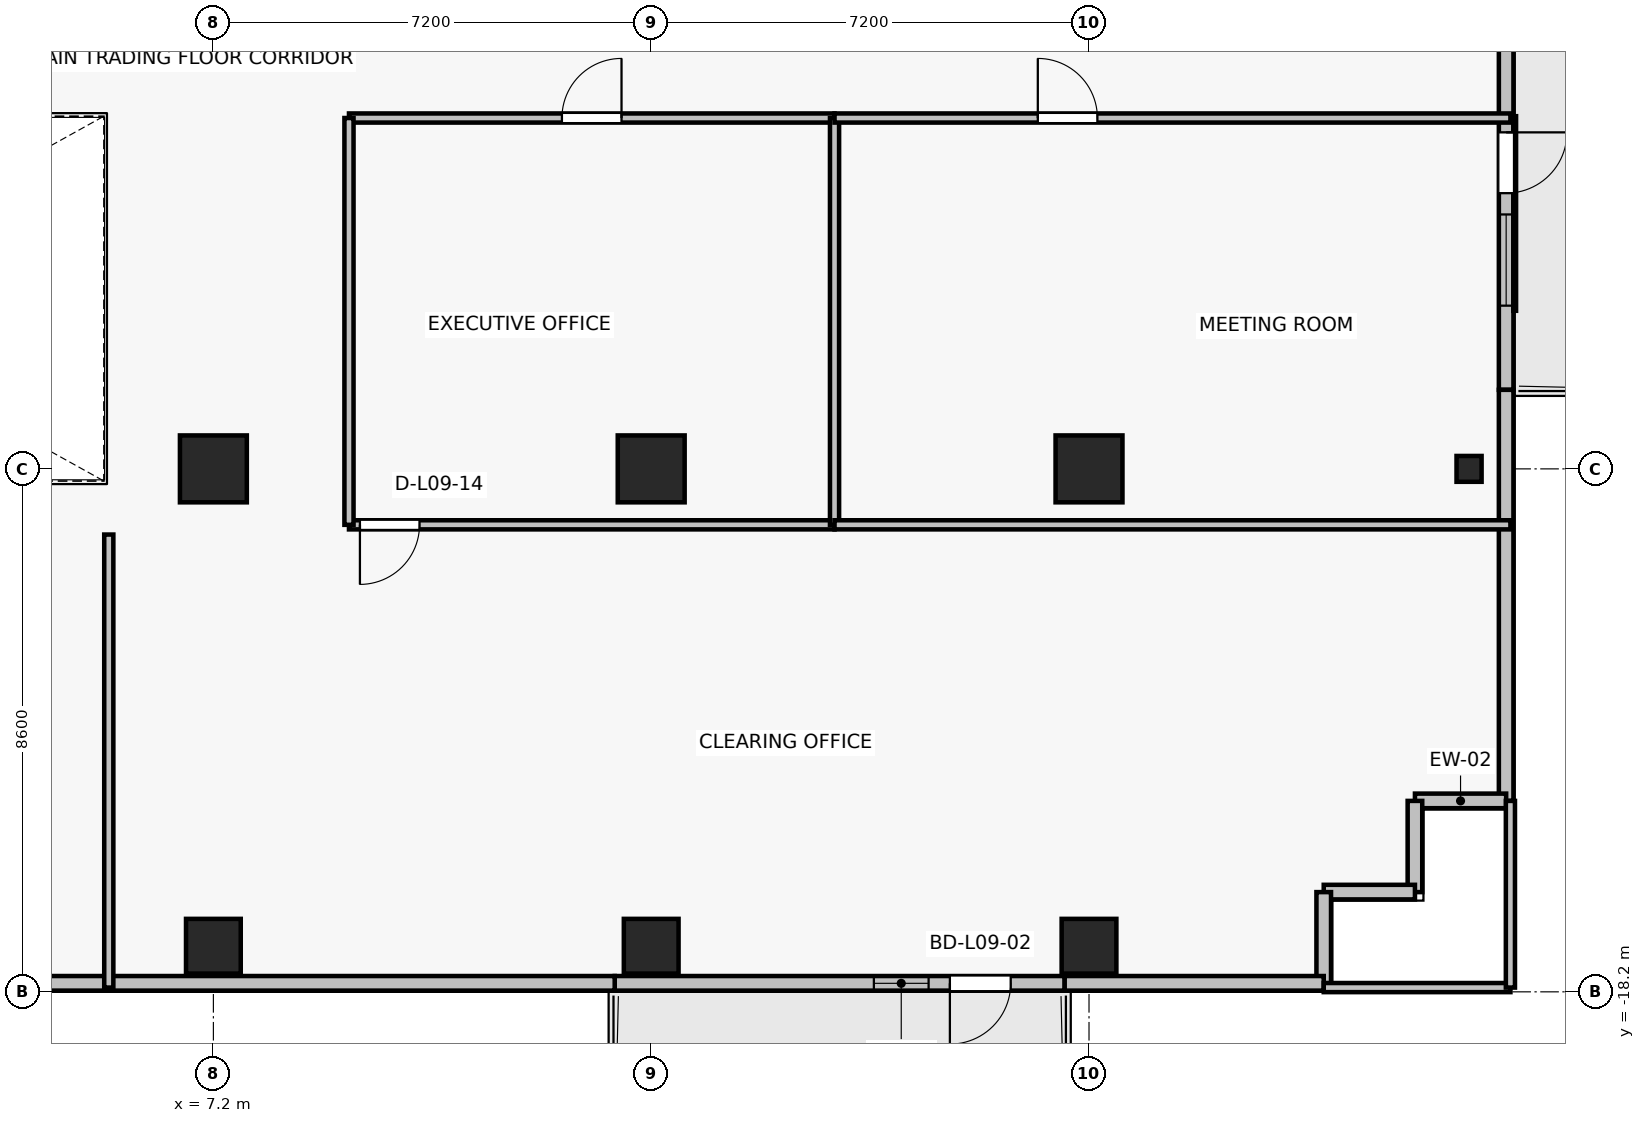
"""IFC4 building model, lengths in metres.
Left out: names, types, materials, properties, quantities, classifications, styles, units other than length and angle.
Written with IfcOpenShell. Run it as: python <this file> out.ifc"""

import sys

from ifc_helpers import new_model, si_unit, direction, frame, frame_2d, origin, origin_2d, place, context, subcontext, project, spatial, rectangle, i_section, extrude, source, transform, mapped, element, fill, save


model = new_model("IFC4")
c1 = context("Model", 3, precision=1e-05, world=origin(), true_north=direction((0.0, 1.0)))
c2 = subcontext(c1, "Body", "Model", "MODEL_VIEW")
j1 = project(units=[si_unit("LENGTHUNIT", "METRE"), si_unit("PLANEANGLEUNIT", "RADIAN")], contexts=[c1])
p1 = place(None, origin())
s1 = spatial("IfcSite", under=j1, at=p1, CompositionType="ELEMENT")
p2 = place(p1, origin())
s2 = spatial("IfcBuilding", under=s1, at=p2, CompositionType="ELEMENT")
p3 = place(p2, frame((0.0, 0.0, 37.3)))
s3 = spatial("IfcBuildingStorey", under=s2, at=p3, CompositionType="ELEMENT", Elevation=37.3)
for number, where, z_axis, x_axis in (
    (1, (7.2, -9.6, 0.0), (0.0, 0.0, 1.0), (1.0, 0.0, 0.0)),
    (2, (14.4, -9.6, 0.0), (0.0, 0.0, 1.0), (1.0, 0.0, 0.0)),
    (3, (21.6, -9.6, 0.0), (0.0, 0.0, 1.0), (1.0, 0.0, 0.0)),
):
    element("IfcColumn", number, at=place(p3, frame(where, z_axis=z_axis, x_axis=x_axis)), inside=s3, PredefinedType="COLUMN", context=c2, shape_type="SweptSolid", body=[
        extrude(rectangle(XDim=1.1, YDim=1.1, at=origin_2d()), origin(), (0.0, 0.0, 1.0), 3.3),
    ])
for number, where, z_axis, x_axis in (
    (4, (7.2, -17.45, 0.0), (0.0, 0.0, 1.0), (1.0, 0.0, 0.0)),
    (5, (14.4, -17.45, 0.0), (0.0, 0.0, 1.0), (1.0, 0.0, 0.0)),
    (6, (21.6, -17.45, 0.0), (0.0, 0.0, 1.0), (1.0, 0.0, 0.0)),
):
    element("IfcColumn", number, at=place(p3, frame(where, z_axis=z_axis, x_axis=x_axis)), inside=s3, PredefinedType="COLUMN", context=c2, shape_type="SweptSolid", body=[
        extrude(rectangle(XDim=0.9, YDim=0.9, at=origin_2d()), origin(), (0.0, 0.0, 1.0), 3.3),
    ])
p4 = place(p3, frame((27.85, -9.6, 0.0), z_axis=(0.0, 0.0, 1.0), x_axis=(1.0, 0.0, 0.0)))
e7 = element("IfcColumn", 7, at=p4, inside=s3, PredefinedType="COLUMN", context=c2, shape_type="SweptSolid", body=[
    extrude(i_section(OverallWidth=0.412, OverallDepth=0.425, WebThickness=0.026, FlangeThickness=0.039, FilletRadius=0.015, at=origin_2d()), origin(), (0.0, 0.0, 1.0), 3.3),
])
p5 = place(p3, frame((21.2, -18.06, 0.0), z_axis=(0.0, 0.0, 1.0), x_axis=(-1.0, 0.0, 0.0)))
e8 = element("IfcWall", 8, at=p5, inside=s3, PredefinedType="SOLIDWALL", context=c2, shape_type="SweptSolid", body=[
    extrude(rectangle(XDim=7.4, YDim=0.24, at=frame_2d((3.7, 0.0))), origin(), (0.0, 0.0, 1.0), 2.665),
])
p6 = place(p5, frame((0.888, 0.0, 0.0)))
e9 = element("IfcOpeningElement", 9, at=p6, cuts=e8, PredefinedType="OPENING", context=c2, shape_type="SweptSolid", body=[
    extrude(rectangle(XDim=1.0, YDim=2.2, at=frame_2d((0.5, 1.1))), frame((0.0, 0.13, 0.0), z_axis=(0.0, -1.0, 0.0), x_axis=(1.0, 0.0, 0.0)), (0.0, 0.0, 1.0), 0.26),
])
p7 = place(p5, frame((2.238, 0.0, 0.85)))
e10 = element("IfcOpeningElement", 10, at=p7, cuts=e8, PredefinedType="OPENING", context=c2, shape_type="SweptSolid", body=[
    extrude(rectangle(XDim=0.9, YDim=1.35, at=frame_2d((0.45, 0.675))), frame((0.0, 0.13, 0.0), z_axis=(0.0, -1.0, 0.0), x_axis=(1.0, 0.0, 0.0)), (0.0, 0.0, 1.0), 0.26),
])
p8 = place(p3, frame((28.46, -2.5, 0.0), z_axis=(0.0, 0.0, 1.0), x_axis=(0.0, -1.0, 0.0)))
e11 = element("IfcWall", 11, at=p8, inside=s3, PredefinedType="SOLIDWALL", context=c2, shape_type="SweptSolid", body=[
    extrude(rectangle(XDim=5.8, YDim=0.24, at=frame_2d((2.9, 0.0))), origin(), (0.0, 0.0, 1.0), 3.075),
])
p9 = place(p8, frame((1.566, 0.0, 0.0)))
e12 = element("IfcOpeningElement", 12, at=p9, cuts=e11, PredefinedType="OPENING", context=c2, shape_type="SweptSolid", body=[
    extrude(rectangle(XDim=1.0, YDim=2.2, at=frame_2d((0.5, 1.1))), frame((0.0, 0.13, 0.0), z_axis=(0.0, -1.0, 0.0), x_axis=(1.0, 0.0, 0.0)), (0.0, 0.0, 1.0), 0.26),
])
p10 = place(p8, frame((2.916, 0.0, 0.85)))
e13 = element("IfcOpeningElement", 13, at=p10, cuts=e11, PredefinedType="OPENING", context=c2, shape_type="SweptSolid", body=[
    extrude(rectangle(XDim=1.5, YDim=1.6, at=frame_2d((0.75, 0.8))), frame((0.0, 0.13, 0.0), z_axis=(0.0, -1.0, 0.0), x_axis=(1.0, 0.0, 0.0)), (0.0, 0.0, 1.0), 0.26),
])
p11 = place(p3, frame((28.46, -15.06, 0.0), z_axis=(0.0, 0.0, 1.0), x_axis=(0.0, 1.0, 0.0)))
e14 = element("IfcWall", 14, at=p11, inside=s3, PredefinedType="SOLIDWALL", context=c2, shape_type="SweptSolid", body=[
    extrude(rectangle(XDim=6.76, YDim=0.24, at=frame_2d((3.38, 0.0))), origin(), (0.0, 0.0, 1.0), 3.075),
])
for number, where, z_axis, x_axis in (
    (15, (26.96, -15.06, 0.0), (0.0, 0.0, 1.0), (1.0, 0.0, 0.0)),
    (16, (26.96, -16.56, 0.0), (0.0, 0.0, 1.0), (0.0, 1.0, 0.0)),
    (17, (25.46, -16.56, 0.0), (0.0, 0.0, 1.0), (1.0, 0.0, 0.0)),
    (18, (25.46, -18.06, 0.0), (0.0, 0.0, 1.0), (0.0, 1.0, 0.0)),
):
    element("IfcWall", number, at=place(p3, frame(where, z_axis=z_axis, x_axis=x_axis)), inside=s3, PredefinedType="SOLIDWALL", context=c2, shape_type="SweptSolid", body=[
        extrude(rectangle(XDim=1.5, YDim=0.24, at=frame_2d((0.75, 0.0))), origin(), (0.0, 0.0, 1.0), 3.075),
    ])
p12 = place(p3, frame((21.2, -18.06, 0.0), z_axis=(0.0, 0.0, 1.0), x_axis=(1.0, 0.0, 0.0)))
e19 = element("IfcWall", 19, at=p12, inside=s3, PredefinedType="SOLIDWALL", context=c2, shape_type="SweptSolid", body=[
    extrude(rectangle(XDim=4.26, YDim=0.24, at=frame_2d((2.13, 0.0))), origin(), (0.0, 0.0, 1.0), 3.075),
])
p13 = place(p3, frame((3.34, -18.06, 0.0), z_axis=(0.0, 0.0, 1.0), x_axis=(1.0, 0.0, 0.0)))
e20 = element("IfcWall", 20, at=p13, inside=s3, PredefinedType="SOLIDWALL", context=c2, shape_type="SweptSolid", body=[
    extrude(rectangle(XDim=10.46, YDim=0.24, at=frame_2d((5.23, 0.0))), origin(), (0.0, 0.0, 1.0), 2.665),
])
p14 = place(p3, frame((17.415, -10.52, 0.0), z_axis=(0.0, 0.0, 1.0), x_axis=(-1.0, 0.0, 0.0)))
e21 = element("IfcWall", 21, at=p14, inside=s3, PredefinedType="PARTITIONING", context=c2, shape_type="SweptSolid", body=[
    extrude(rectangle(XDim=7.985, YDim=0.15, at=frame_2d((3.993, 0.0))), origin(), (0.0, 0.0, 1.0), 2.465),
])
p15 = place(p14, frame((6.825, 0.0, 0.0)))
e22 = element("IfcOpeningElement", 22, at=p15, cuts=e21, PredefinedType="OPENING", context=c2, shape_type="SweptSolid", body=[
    extrude(rectangle(XDim=0.98, YDim=2.15, at=frame_2d((0.49, 1.075))), frame((0.0, 0.085, 0.0), z_axis=(0.0, -1.0, 0.0), x_axis=(1.0, 0.0, 0.0)), (0.0, 0.0, 1.0), 0.17),
])
p16 = place(p3, frame((9.43, -3.83, 0.0), z_axis=(0.0, 0.0, 1.0), x_axis=(1.0, 0.0, 0.0)))
e23 = element("IfcWall", 23, at=p16, inside=s3, PredefinedType="PARTITIONING", context=c2, shape_type="SweptSolid", body=[
    extrude(rectangle(XDim=7.985, YDim=0.15, at=frame_2d((3.993, 0.0))), origin(), (0.0, 0.0, 1.0), 2.465),
])
p17 = place(p16, frame((3.502, 0.0, 0.0)))
e24 = element("IfcOpeningElement", 24, at=p17, cuts=e23, PredefinedType="OPENING", context=c2, shape_type="SweptSolid", body=[
    extrude(rectangle(XDim=0.98, YDim=2.15, at=frame_2d((0.49, 1.075))), frame((0.0, 0.085, 0.0), z_axis=(0.0, -1.0, 0.0), x_axis=(1.0, 0.0, 0.0)), (0.0, 0.0, 1.0), 0.17),
])
for number, where, z_axis, x_axis in (
    (25, (9.43, -10.52, 0.0), (0.0, 0.0, 1.0), (0.0, 1.0, 0.0)),
    (26, (17.415, -3.83, 0.0), (0.0, 0.0, 1.0), (0.0, -1.0, 0.0)),
):
    element("IfcWall", number, at=place(p3, frame(where, z_axis=z_axis, x_axis=x_axis)), inside=s3, PredefinedType="PARTITIONING", context=c2, shape_type="SweptSolid", body=[
        extrude(rectangle(XDim=6.69, YDim=0.15, at=frame_2d((3.345, 0.0))), origin(), (0.0, 0.0, 1.0), 2.465),
    ])
p18 = place(p3, frame((28.53, -10.52, 0.0), z_axis=(0.0, 0.0, 1.0), x_axis=(-1.0, 0.0, 0.0)))
e27 = element("IfcWall", 27, at=p18, inside=s3, PredefinedType="PARTITIONING", context=c2, shape_type="SweptSolid", body=[
    extrude(rectangle(XDim=11.115, YDim=0.15, at=frame_2d((5.558, 0.0))), origin(), (0.0, 0.0, 1.0), 2.465),
])
p19 = place(p3, frame((17.415, -3.83, 0.0), z_axis=(0.0, 0.0, 1.0), x_axis=(1.0, 0.0, 0.0)))
e28 = element("IfcWall", 28, at=p19, inside=s3, PredefinedType="PARTITIONING", context=c2, shape_type="SweptSolid", body=[
    extrude(rectangle(XDim=11.115, YDim=0.15, at=frame_2d((5.558, 0.0))), origin(), (0.0, 0.0, 1.0), 2.465),
])
p20 = place(p19, frame((3.343, 0.0, 0.0)))
e29 = element("IfcOpeningElement", 29, at=p20, cuts=e28, PredefinedType="OPENING", context=c2, shape_type="SweptSolid", body=[
    extrude(rectangle(XDim=0.98, YDim=2.15, at=frame_2d((0.49, 1.075))), frame((0.0, 0.085, 0.0), z_axis=(0.0, -1.0, 0.0), x_axis=(1.0, 0.0, 0.0)), (0.0, 0.0, 1.0), 0.17),
])
p21 = place(p3, frame((28.53, -18.13, 0.0), z_axis=(0.0, 0.0, 1.0), x_axis=(-1.0, 0.0, 0.0)))
e30 = element("IfcWall", 30, at=p21, inside=s3, PredefinedType="PARTITIONING", context=c2, shape_type="SweptSolid", body=[
    extrude(rectangle(XDim=3.07, YDim=0.15, at=frame_2d((1.535, 0.0))), origin(), (0.0, 0.0, 1.0), 2.665),
])
p22 = place(p3, frame((5.48, -18.13, 0.0), z_axis=(0.0, 0.0, 1.0), x_axis=(0.0, 1.0, 0.0)))
e31 = element("IfcWall", 31, at=p22, inside=s3, PredefinedType="PARTITIONING", context=c2, shape_type="SweptSolid", body=[
    extrude(rectangle(XDim=7.45, YDim=0.15, at=frame_2d((3.725, 0.0))), origin(), (0.0, 0.0, 1.0), 2.465),
])
p23 = place(p3, frame((28.53, -15.06, 0.0), z_axis=(0.0, 0.0, 1.0), x_axis=(0.0, -1.0, 0.0)))
e32 = element("IfcWall", 32, at=p23, inside=s3, PredefinedType="PARTITIONING", context=c2, shape_type="SweptSolid", body=[
    extrude(rectangle(XDim=3.07, YDim=0.15, at=frame_2d((1.535, 0.0))), origin(), (0.0, 0.0, 1.0), 3.075),
])
m1 = source(origin(), c2, "Body", "SweptSolid", [
    extrude(rectangle(XDim=1.0, YDim=2.2, at=frame_2d((0.5, 1.1))), frame((0.0, 0.025, 0.0), z_axis=(0.0, -1.0, 0.0), x_axis=(1.0, 0.0, 0.0)), (0.0, 0.0, 1.0), 0.05),
])
p24 = place(p6, origin())
e33 = element("IfcDoor", 33, at=p24, inside=s3, OperationType="SINGLE_SWING_RIGHT", PredefinedType="DOOR", context=c2, shape_type="MappedRepresentation", body=[
    mapped(m1, transform((0.0, 0.0, 0.0), x_axis=(1.0, 0.0, 0.0), y_axis=(0.0, 1.0, 0.0), z_axis=(0.0, 0.0, 1.0), scale=1.0)),
])
fill(e9, e33)
m2 = source(origin(), c2, "Body", "SweptSolid", [
    extrude(rectangle(XDim=0.9, YDim=1.35, at=frame_2d((0.45, 0.675))), frame((0.0, 0.03, 0.0), z_axis=(0.0, -1.0, 0.0), x_axis=(1.0, 0.0, 0.0)), (0.0, 0.0, 1.0), 0.06),
])
p25 = place(p7, origin())
e34 = element("IfcWindow", 34, at=p25, inside=s3, PartitioningType="SINGLE_PANEL", PredefinedType="WINDOW", context=c2, shape_type="MappedRepresentation", body=[
    mapped(m2, transform((0.0, 0.0, 0.0), x_axis=(1.0, 0.0, 0.0), y_axis=(0.0, 1.0, 0.0), z_axis=(0.0, 0.0, 1.0), scale=1.0)),
])
fill(e10, e34)
p26 = place(p9, origin())
e35 = element("IfcDoor", 35, at=p26, inside=s3, OperationType="SINGLE_SWING_LEFT", PredefinedType="DOOR", context=c2, shape_type="MappedRepresentation", body=[
    mapped(m1, transform((0.0, 0.0, 0.0), x_axis=(1.0, 0.0, 0.0), y_axis=(0.0, 1.0, 0.0), z_axis=(0.0, 0.0, 1.0), scale=1.0)),
])
fill(e12, e35)
m3 = source(origin(), c2, "Body", "SweptSolid", [
    extrude(rectangle(XDim=1.5, YDim=1.6, at=frame_2d((0.75, 0.8))), frame((0.0, 0.03, 0.0), z_axis=(0.0, -1.0, 0.0), x_axis=(1.0, 0.0, 0.0)), (0.0, 0.0, 1.0), 0.06),
])
p27 = place(p10, origin())
e36 = element("IfcWindow", 36, at=p27, inside=s3, PartitioningType="SINGLE_PANEL", PredefinedType="WINDOW", context=c2, shape_type="MappedRepresentation", body=[
    mapped(m3, transform((0.0, 0.0, 0.0), x_axis=(1.0, 0.0, 0.0), y_axis=(0.0, 1.0, 0.0), z_axis=(0.0, 0.0, 1.0), scale=1.0)),
])
fill(e13, e36)
m4 = source(origin(), c2, "Body", "SweptSolid", [
    extrude(rectangle(XDim=0.98, YDim=2.15, at=frame_2d((0.49, 1.075))), frame((0.0, 0.025, 0.0), z_axis=(0.0, -1.0, 0.0), x_axis=(1.0, 0.0, 0.0)), (0.0, 0.0, 1.0), 0.05),
])
p28 = place(p17, origin())
e37 = element("IfcDoor", 37, at=p28, inside=s3, OperationType="SINGLE_SWING_RIGHT", PredefinedType="DOOR", context=c2, shape_type="MappedRepresentation", body=[
    mapped(m4, transform((0.0, 0.0, 0.0), x_axis=(1.0, 0.0, 0.0), y_axis=(0.0, 1.0, 0.0), z_axis=(0.0, 0.0, 1.0), scale=1.0)),
])
fill(e24, e37)
p29 = place(p20, origin())
e38 = element("IfcDoor", 38, at=p29, inside=s3, OperationType="SINGLE_SWING_LEFT", PredefinedType="DOOR", context=c2, shape_type="MappedRepresentation", body=[
    mapped(m4, transform((0.0, 0.0, 0.0), x_axis=(1.0, 0.0, 0.0), y_axis=(0.0, 1.0, 0.0), z_axis=(0.0, 0.0, 1.0), scale=1.0)),
])
fill(e29, e38)
p30 = place(p15, origin())
e39 = element("IfcDoor", 39, at=p30, inside=s3, OperationType="SINGLE_SWING_RIGHT", PredefinedType="DOOR", context=c2, shape_type="MappedRepresentation", body=[
    mapped(m4, transform((0.0, 0.0, 0.0), x_axis=(1.0, 0.0, 0.0), y_axis=(0.0, 1.0, 0.0), z_axis=(0.0, 0.0, 1.0), scale=1.0)),
])
fill(e22, e39)
save(model, sys.argv[1])
